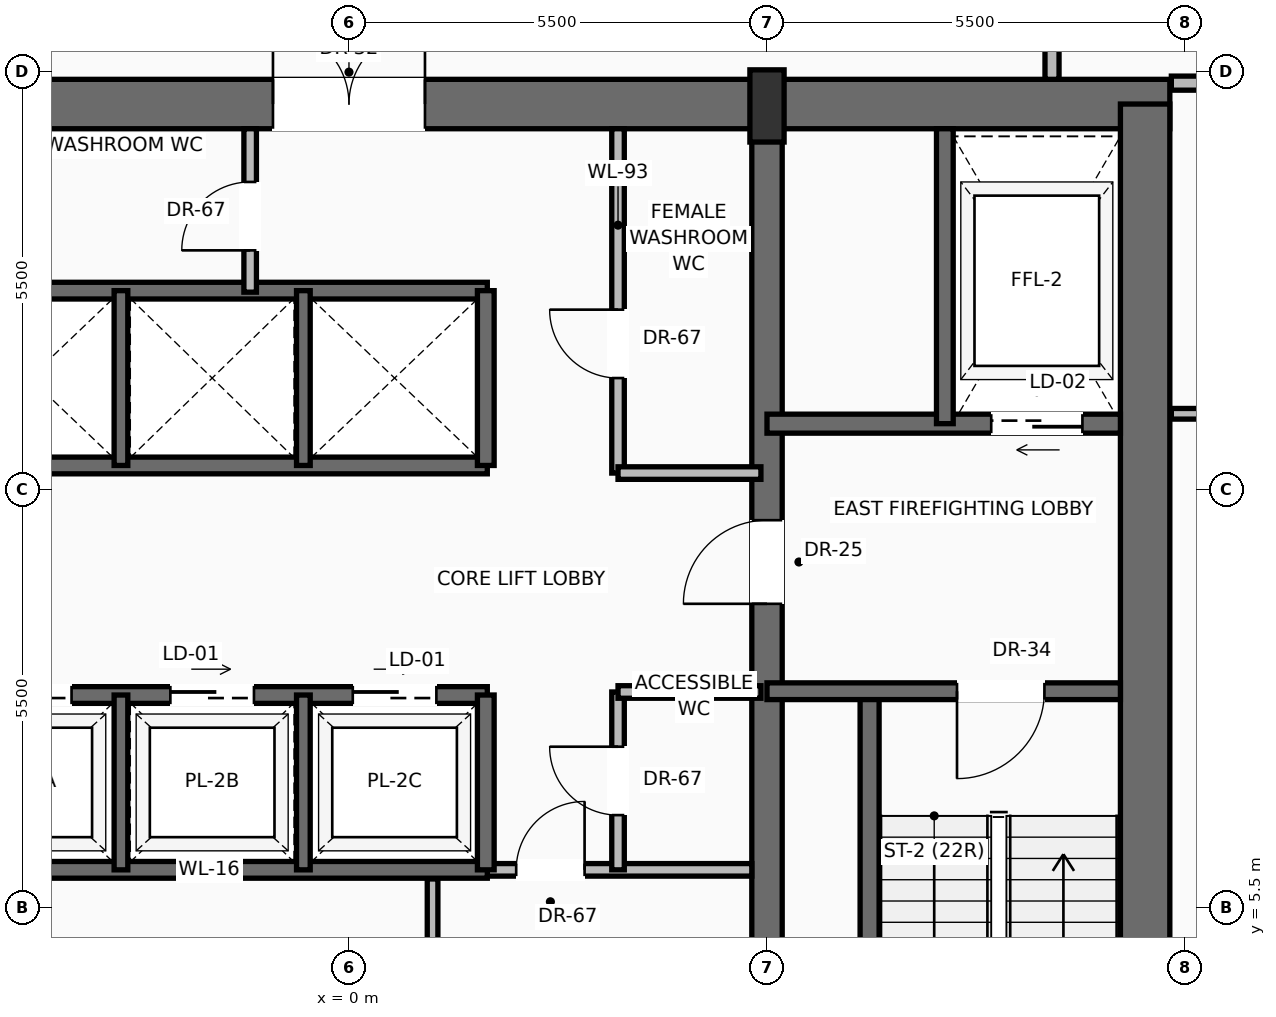
"""IFC4 building model, lengths in metres.
Left out: names, types, materials, properties, quantities, classifications, styles, units other than length and angle.
Written with IfcOpenShell. Run it as: python <this file> out.ifc"""

import sys

from ifc_helpers import new_model, si_unit, direction, frame, frame_2d, origin, origin_2d, place, context, subcontext, project, spatial, rectangle, extrude, source, transform, mapped, element, fill, save


model = new_model("IFC4")
c1 = context("Model", 3, precision=1e-05, world=origin(), true_north=direction((0.0, 1.0)))
c2 = subcontext(c1, "Body", "Model", "MODEL_VIEW")
j1 = project(units=[si_unit("LENGTHUNIT", "METRE"), si_unit("PLANEANGLEUNIT", "RADIAN")], contexts=[c1])
p1 = place(None, origin())
s1 = spatial("IfcSite", under=j1, at=p1, CompositionType="ELEMENT")
p2 = place(p1, origin())
s2 = spatial("IfcBuilding", under=s1, at=p2, CompositionType="ELEMENT")
p3 = place(p2, frame((0.0, 0.0, 133.0)))
s3 = spatial("IfcBuildingStorey", under=s2, at=p3, CompositionType="ELEMENT", Elevation=133.0)
p4 = place(p3, frame((-10.8, 16.075, 0.0), z_axis=(0.0, 0.0, 1.0), x_axis=(1.0, 0.0, 0.0)))
e1 = element("IfcWall", 1, at=p4, inside=s3, PredefinedType="SHEAR", context=c2, shape_type="SweptSolid", body=[
    extrude(rectangle(XDim=21.6, YDim=0.65, at=frame_2d((10.8, 0.0))), origin(), (0.0, 0.0, 1.0), 3.47),
])
p5 = place(p4, frame((3.37, 0.0, 0.0)))
e2 = element("IfcOpeningElement", 2, at=p5, cuts=e1, PredefinedType="OPENING", context=c2, shape_type="SweptSolid", body=[
    extrude(rectangle(XDim=1.3, YDim=2.3, at=frame_2d((0.65, 1.15))), frame((0.0, 0.335, 0.0), z_axis=(0.0, -1.0, 0.0), x_axis=(1.0, 0.0, 0.0)), (0.0, 0.0, 1.0), 0.67),
])
p6 = place(p4, frame((9.8, 0.0, 0.0)))
e3 = element("IfcOpeningElement", 3, at=p6, cuts=e1, PredefinedType="OPENING", context=c2, shape_type="SweptSolid", body=[
    extrude(rectangle(XDim=2.0, YDim=2.4, at=frame_2d((1.0, 1.2))), frame((0.0, 0.335, 0.0), z_axis=(0.0, -1.0, 0.0), x_axis=(1.0, 0.0, 0.0)), (0.0, 0.0, 1.0), 0.67),
])
p7 = place(p3, frame((10.475, 0.525, 0.0), z_axis=(0.0, 0.0, 1.0), x_axis=(0.0, 1.0, 0.0)))
e4 = element("IfcWall", 4, at=p7, inside=s3, PredefinedType="SHEAR", context=c2, shape_type="SweptSolid", body=[
    extrude(rectangle(XDim=15.55, YDim=0.65, at=frame_2d((7.775, 0.0))), origin(), (0.0, 0.0, 1.0), 3.47),
])
p8 = place(p3, frame((5.5, 0.525, 0.0), z_axis=(0.0, 0.0, 1.0), x_axis=(0.0, 1.0, 0.0)))
e5 = element("IfcWall", 5, at=p8, inside=s3, PredefinedType="SHEAR", context=c2, shape_type="SweptSolid", body=[
    extrude(rectangle(XDim=15.55, YDim=0.4, at=frame_2d((7.775, 0.0))), origin(), (0.0, 0.0, 1.0), 3.47),
])
p9 = place(p8, frame((8.975, 0.0, 0.0)))
e6 = element("IfcOpeningElement", 6, at=p9, cuts=e5, PredefinedType="OPENING", context=c2, shape_type="SweptSolid", body=[
    extrude(rectangle(XDim=1.1, YDim=2.2, at=frame_2d((0.55, 1.1))), frame((0.0, 0.21, 0.0), z_axis=(0.0, -1.0, 0.0), x_axis=(1.0, 0.0, 0.0)), (0.0, 0.0, 1.0), 0.42),
])
m1 = source(origin(), c2, "Body", "SweptSolid", [
    extrude(rectangle(XDim=0.45, YDim=0.95, at=origin_2d()), origin(), (0.0, 0.0, 1.0), 3.7),
])
p10 = place(p3, frame((5.5, 16.05, 0.0), z_axis=(0.0, 0.0, 1.0), x_axis=(1.0, 0.0, 0.0)))
e7 = element("IfcColumn", 7, at=p10, inside=s3, PredefinedType="PILASTER", context=c2, shape_type="MappedRepresentation", body=[
    mapped(m1, transform((0.0, 0.0, 0.0), scale=1.0)),
])
p11 = place(p3, frame((6.85, 0.85, 0.0), z_axis=(0.0, 0.0, 1.0), x_axis=(0.0, 1.0, 0.0)))
e8 = element("IfcWall", 8, at=p11, inside=s3, PredefinedType="SOLIDWALL", context=c2, shape_type="SweptSolid", body=[
    extrude(rectangle(XDim=7.5, YDim=0.25, at=frame_2d((3.75, 0.0))), origin(), (0.0, 0.0, 1.0), 3.47),
])
p12 = place(p3, frame((10.15, 8.35, 0.0), z_axis=(0.0, 0.0, 1.0), x_axis=(-1.0, 0.0, 0.0)))
e9 = element("IfcWall", 9, at=p12, inside=s3, PredefinedType="SOLIDWALL", context=c2, shape_type="SweptSolid", body=[
    extrude(rectangle(XDim=4.65, YDim=0.22, at=frame_2d((2.325, 0.0))), origin(), (0.0, 0.0, 1.0), 3.47),
])
p13 = place(p12, frame((1.0, 0.0, 0.0)))
e10 = element("IfcOpeningElement", 10, at=p13, cuts=e9, PredefinedType="OPENING", context=c2, shape_type="SweptSolid", body=[
    extrude(rectangle(XDim=1.15, YDim=2.2, at=frame_2d((0.575, 1.1))), frame((0.0, 0.12, 0.0), z_axis=(0.0, -1.0, 0.0), x_axis=(1.0, 0.0, 0.0)), (0.0, 0.0, 1.0), 0.24),
])
p14 = place(p3, frame((10.15, 11.87, 0.0), z_axis=(0.0, 0.0, 1.0), x_axis=(-1.0, 0.0, 0.0)))
e11 = element("IfcWall", 11, at=p14, inside=s3, PredefinedType="SOLIDWALL", context=c2, shape_type="SweptSolid", body=[
    extrude(rectangle(XDim=4.65, YDim=0.25, at=frame_2d((2.325, 0.0))), origin(), (0.0, 0.0, 1.0), 3.47),
])
p15 = place(p14, frame((0.5, 0.0, 0.0)))
e12 = element("IfcOpeningElement", 12, at=p15, cuts=e11, PredefinedType="OPENING", context=c2, shape_type="SweptSolid", body=[
    extrude(rectangle(XDim=1.2, YDim=2.25, at=frame_2d((0.6, 1.125))), frame((0.0, 0.135, 0.0), z_axis=(0.0, -1.0, 0.0), x_axis=(1.0, 0.0, 0.0)), (0.0, 0.0, 1.0), 0.27),
])
p16 = place(p3, frame((7.84, 11.87, 0.0), z_axis=(0.0, 0.0, 1.0), x_axis=(0.0, 1.0, 0.0)))
e13 = element("IfcWall", 13, at=p16, inside=s3, PredefinedType="SOLIDWALL", context=c2, shape_type="SweptSolid", body=[
    extrude(rectangle(XDim=3.88, YDim=0.22, at=frame_2d((1.94, 0.0))), origin(), (0.0, 0.0, 1.0), 3.47),
])
p17 = place(p3, frame((1.82, 6.0, 0.0), z_axis=(0.0, 0.0, 1.0), x_axis=(1.0, 0.0, 0.0)))
e14 = element("IfcWall", 14, at=p17, inside=s3, PredefinedType="PARTITIONING", context=c2, shape_type="SweptSolid", body=[
    extrude(rectangle(XDim=3.48, YDim=0.165, at=frame_2d((1.74, 0.0))), origin(), (0.0, 0.0, 1.0), 3.462),
])
p18 = place(p17, frame((0.38, 0.0, 0.0)))
e15 = element("IfcOpeningElement", 15, at=p18, cuts=e14, PredefinedType="OPENING", context=c2, shape_type="SweptSolid", body=[
    extrude(rectangle(XDim=0.9, YDim=2.1, at=frame_2d((0.45, 1.05))), frame((0.0, 0.093, 0.0), z_axis=(0.0, -1.0, 0.0), x_axis=(1.0, 0.0, 0.0)), (0.0, 0.0, 1.0), 0.185),
])
p19 = place(p3, frame((1.1, 0.85, 0.0), z_axis=(0.0, 0.0, 1.0), x_axis=(0.0, 1.0, 0.0)))
e16 = element("IfcWall", 16, at=p19, inside=s3, PredefinedType="PARTITIONING", context=c2, shape_type="SweptSolid", body=[
    extrude(rectangle(XDim=5.03, YDim=0.14, at=frame_2d((2.515, 0.0))), origin(), (0.0, 0.0, 1.0), 3.462),
])
p20 = place(p19, frame((2.1, 0.0, 0.0)))
e17 = element("IfcOpeningElement", 17, at=p20, cuts=e16, PredefinedType="OPENING", context=c2, shape_type="SweptSolid", body=[
    extrude(rectangle(XDim=0.9, YDim=2.1, at=frame_2d((0.45, 1.05))), frame((0.0, 0.08, 0.0), z_axis=(0.0, -1.0, 0.0), x_axis=(1.0, 0.0, 0.0)), (0.0, 0.0, 1.0), 0.16),
])
p21 = place(p3, frame((3.54, 6.0, 0.0), z_axis=(0.0, 0.0, 1.0), x_axis=(0.0, 1.0, 0.0)))
e18 = element("IfcWall", 18, at=p21, inside=s3, PredefinedType="PARTITIONING", context=c2, shape_type="SweptSolid", body=[
    extrude(rectangle(XDim=2.34, YDim=0.165, at=frame_2d((1.17, 0.0))), origin(), (0.0, 0.0, 1.0), 3.462),
])
p22 = place(p21, frame((0.72, 0.0, 0.0)))
e19 = element("IfcOpeningElement", 19, at=p22, cuts=e18, PredefinedType="OPENING", context=c2, shape_type="SweptSolid", body=[
    extrude(rectangle(XDim=0.9, YDim=2.1, at=frame_2d((0.45, 1.05))), frame((0.0, 0.093, 0.0), z_axis=(0.0, -1.0, 0.0), x_axis=(1.0, 0.0, 0.0)), (0.0, 0.0, 1.0), 0.185),
])
p23 = place(p3, frame((3.54, 8.34, 0.0), z_axis=(0.0, 0.0, 1.0), x_axis=(1.0, 0.0, 0.0)))
e20 = element("IfcWall", 20, at=p23, inside=s3, PredefinedType="PARTITIONING", context=c2, shape_type="SweptSolid", body=[
    extrude(rectangle(XDim=1.88, YDim=0.165, at=frame_2d((0.94, 0.0))), origin(), (0.0, 0.0, 1.0), 3.462),
])
p24 = place(p3, frame((-5.5, 6.0, 0.0), z_axis=(0.0, 0.0, 1.0), x_axis=(1.0, 0.0, 0.0)))
e21 = element("IfcWall", 21, at=p24, inside=s3, PredefinedType="SOLIDWALL", context=c2, shape_type="SweptSolid", body=[
    extrude(rectangle(XDim=7.32, YDim=0.22, at=frame_2d((3.66, 0.0))), origin(), (0.0, 0.0, 1.0), 3.47),
])
p25 = place(p3, frame((-5.5, 8.3, 0.0), z_axis=(0.0, 0.0, 1.0), x_axis=(1.0, 0.0, 0.0)))
e22 = element("IfcWall", 22, at=p25, inside=s3, PredefinedType="SOLIDWALL", context=c2, shape_type="SweptSolid", body=[
    extrude(rectangle(XDim=7.32, YDim=0.22, at=frame_2d((3.66, 0.0))), origin(), (0.0, 0.0, 1.0), 3.47),
])
p26 = place(p25, frame((0.75, 0.0, 0.0)))
e23 = element("IfcOpeningElement", 23, at=p26, cuts=e22, PredefinedType="OPENING", context=c2, shape_type="SweptSolid", body=[
    extrude(rectangle(XDim=1.1, YDim=2.2, at=frame_2d((0.55, 1.1))), frame((0.0, 0.12, 0.0), z_axis=(0.0, -1.0, 0.0), x_axis=(1.0, 0.0, 0.0)), (0.0, 0.0, 1.0), 0.24),
])
p27 = place(p25, frame((3.15, 0.0, 0.0)))
e24 = element("IfcOpeningElement", 24, at=p27, cuts=e22, PredefinedType="OPENING", context=c2, shape_type="SweptSolid", body=[
    extrude(rectangle(XDim=1.1, YDim=2.2, at=frame_2d((0.55, 1.1))), frame((0.0, 0.12, 0.0), z_axis=(0.0, -1.0, 0.0), x_axis=(1.0, 0.0, 0.0)), (0.0, 0.0, 1.0), 0.24),
])
p28 = place(p25, frame((5.55, 0.0, 0.0)))
e25 = element("IfcOpeningElement", 25, at=p28, cuts=e22, PredefinedType="OPENING", context=c2, shape_type="SweptSolid", body=[
    extrude(rectangle(XDim=1.1, YDim=2.2, at=frame_2d((0.55, 1.1))), frame((0.0, 0.12, 0.0), z_axis=(0.0, -1.0, 0.0), x_axis=(1.0, 0.0, 0.0)), (0.0, 0.0, 1.0), 0.24),
])
p29 = place(p3, frame((1.8, 6.0, 0.0), z_axis=(0.0, 0.0, 1.0), x_axis=(0.0, 1.0, 0.0)))
e26 = element("IfcWall", 26, at=p29, inside=s3, PredefinedType="SOLIDWALL", context=c2, shape_type="SweptSolid", body=[
    extrude(rectangle(XDim=2.3, YDim=0.22, at=frame_2d((1.15, 0.0))), origin(), (0.0, 0.0, 1.0), 3.47),
])
for number, where, z_axis, x_axis in (
    (27, (-3.0, 6.0, 0.0), (0.0, 0.0, 1.0), (0.0, 1.0, 0.0)),
    (28, (-0.6, 6.0, 0.0), (0.0, 0.0, 1.0), (0.0, 1.0, 0.0)),
):
    element("IfcWall", number, at=place(p3, frame(where, z_axis=z_axis, x_axis=x_axis)), inside=s3, PredefinedType="SOLIDWALL", context=c2, shape_type="SweptSolid", body=[
        extrude(rectangle(XDim=2.3, YDim=0.18, at=frame_2d((1.15, 0.0))), origin(), (0.0, 0.0, 1.0), 3.47),
    ])
for number, where, z_axis, x_axis in (
    (29, (-5.5, 11.32, 0.0), (0.0, 0.0, 1.0), (1.0, 0.0, 0.0)),
    (30, (-5.5, 13.62, 0.0), (0.0, 0.0, 1.0), (1.0, 0.0, 0.0)),
):
    element("IfcWall", number, at=place(p3, frame(where, z_axis=z_axis, x_axis=x_axis)), inside=s3, PredefinedType="SOLIDWALL", context=c2, shape_type="SweptSolid", body=[
        extrude(rectangle(XDim=7.32, YDim=0.22, at=frame_2d((3.66, 0.0))), origin(), (0.0, 0.0, 1.0), 3.47),
    ])
p30 = place(p3, frame((1.8, 11.32, 0.0), z_axis=(0.0, 0.0, 1.0), x_axis=(0.0, 1.0, 0.0)))
e31 = element("IfcWall", 31, at=p30, inside=s3, PredefinedType="SOLIDWALL", context=c2, shape_type="SweptSolid", body=[
    extrude(rectangle(XDim=2.3, YDim=0.22, at=frame_2d((1.15, 0.0))), origin(), (0.0, 0.0, 1.0), 3.47),
])
for number, where, z_axis, x_axis in (
    (32, (-3.0, 11.32, 0.0), (0.0, 0.0, 1.0), (0.0, 1.0, 0.0)),
    (33, (-0.6, 11.32, 0.0), (0.0, 0.0, 1.0), (0.0, 1.0, 0.0)),
):
    element("IfcWall", number, at=place(p3, frame(where, z_axis=z_axis, x_axis=x_axis)), inside=s3, PredefinedType="SOLIDWALL", context=c2, shape_type="SweptSolid", body=[
        extrude(rectangle(XDim=2.3, YDim=0.18, at=frame_2d((1.15, 0.0))), origin(), (0.0, 0.0, 1.0), 3.47),
    ])
p31 = place(p3, frame((-1.3, 13.6, 0.0), z_axis=(0.0, 0.0, 1.0), x_axis=(0.0, 1.0, 0.0)))
e34 = element("IfcWall", 34, at=p31, inside=s3, PredefinedType="PARTITIONING", context=c2, shape_type="SweptSolid", body=[
    extrude(rectangle(XDim=2.15, YDim=0.165, at=frame_2d((1.075, 0.0))), origin(), (0.0, 0.0, 1.0), 3.462),
])
p32 = place(p31, frame((0.55, 0.0, 0.0)))
e35 = element("IfcOpeningElement", 35, at=p32, cuts=e34, PredefinedType="OPENING", context=c2, shape_type="SweptSolid", body=[
    extrude(rectangle(XDim=0.9, YDim=2.1, at=frame_2d((0.45, 1.05))), frame((0.0, 0.093, 0.0), z_axis=(0.0, -1.0, 0.0), x_axis=(1.0, 0.0, 0.0)), (0.0, 0.0, 1.0), 0.185),
])
p33 = place(p3, frame((3.54, 11.22, 0.0), z_axis=(0.0, 0.0, 1.0), x_axis=(0.0, 1.0, 0.0)))
e36 = element("IfcWall", 36, at=p33, inside=s3, PredefinedType="PARTITIONING", context=c2, shape_type="SweptSolid", body=[
    extrude(rectangle(XDim=4.53, YDim=0.165, at=frame_2d((2.265, 0.0))), origin(), (0.0, 0.0, 1.0), 3.462),
])
p34 = place(p33, frame((1.25, 0.0, 0.0)))
e37 = element("IfcOpeningElement", 37, at=p34, cuts=e36, PredefinedType="OPENING", context=c2, shape_type="SweptSolid", body=[
    extrude(rectangle(XDim=0.9, YDim=2.1, at=frame_2d((0.45, 1.05))), frame((0.0, 0.093, 0.0), z_axis=(0.0, -1.0, 0.0), x_axis=(1.0, 0.0, 0.0)), (0.0, 0.0, 1.0), 0.185),
])
p35 = place(p3, frame((3.54, 11.22, 0.0), z_axis=(0.0, 0.0, 1.0), x_axis=(1.0, 0.0, 0.0)))
e38 = element("IfcWall", 38, at=p35, inside=s3, PredefinedType="PARTITIONING", context=c2, shape_type="SweptSolid", body=[
    extrude(rectangle(XDim=1.88, YDim=0.165, at=frame_2d((0.94, 0.0))), origin(), (0.0, 0.0, 1.0), 3.462),
])
p36 = place(p3, frame((9.25, 16.4, 0.0), z_axis=(0.0, 0.0, 1.0), x_axis=(0.0, 1.0, 0.0)))
e39 = element("IfcWall", 39, at=p36, inside=s3, PredefinedType="PARTITIONING", context=c2, shape_type="SweptSolid", body=[
    extrude(rectangle(XDim=9.0, YDim=0.185, at=frame_2d((4.5, 0.0))), origin(), (0.0, 0.0, 1.0), 2.846),
])
p37 = place(p36, frame((4.441, 0.0, 0.0)))
e40 = element("IfcOpeningElement", 40, at=p37, cuts=e39, PredefinedType="OPENING", context=c2, shape_type="SweptSolid", body=[
    extrude(rectangle(XDim=0.95, YDim=2.2, at=frame_2d((0.475, 1.1))), frame((0.0, 0.103, 0.0), z_axis=(0.0, -1.0, 0.0), x_axis=(1.0, 0.0, 0.0)), (0.0, 0.0, 1.0), 0.205),
])
p38 = place(p3, frame((10.82, 16.35, 0.0), z_axis=(0.0, 0.0, 1.0), x_axis=(1.0, 0.0, 0.0)))
e41 = element("IfcWall", 41, at=p38, inside=s3, PredefinedType="PARTITIONING", context=c2, shape_type="SweptSolid", body=[
    extrude(rectangle(XDim=11.333, YDim=0.185, at=frame_2d((5.667, 0.0))), origin(), (0.0, 0.0, 1.0), 3.462),
])
p39 = place(p38, frame((3.594, 0.0, 0.0)))
e42 = element("IfcOpeningElement", 42, at=p39, cuts=e41, PredefinedType="OPENING", context=c2, shape_type="SweptSolid", body=[
    extrude(rectangle(XDim=0.95, YDim=2.2, at=frame_2d((0.475, 1.1))), frame((0.0, 0.103, 0.0), z_axis=(0.0, -1.0, 0.0), x_axis=(1.0, 0.0, 0.0)), (0.0, 0.0, 1.0), 0.205),
])
p40 = place(p3, frame((10.82, 12.0, 0.0), z_axis=(0.0, 0.0, 1.0), x_axis=(1.0, 0.0, 0.0)))
e43 = element("IfcWall", 43, at=p40, inside=s3, PredefinedType="PARTITIONING", context=c2, shape_type="SweptSolid", body=[
    extrude(rectangle(XDim=14.109, YDim=0.14, at=frame_2d((7.055, 0.0))), origin(), (0.0, 0.0, 1.0), 3.462),
])
p41 = place(p40, frame((6.572, 0.0, 0.0)))
e44 = element("IfcOpeningElement", 44, at=p41, cuts=e43, PredefinedType="OPENING", context=c2, shape_type="SweptSolid", body=[
    extrude(rectangle(XDim=0.95, YDim=2.2, at=frame_2d((0.475, 1.1))), frame((0.0, 0.08, 0.0), z_axis=(0.0, -1.0, 0.0), x_axis=(1.0, 0.0, 0.0)), (0.0, 0.0, 1.0), 0.16),
])
m2 = source(origin(), c2, "Body", "SweptSolid", [
    extrude(rectangle(XDim=1.15, YDim=2.2, at=frame_2d((0.575, 1.1))), frame((0.0, 0.025, 0.0), z_axis=(0.0, -1.0, 0.0), x_axis=(1.0, 0.0, 0.0)), (0.0, 0.0, 1.0), 0.05),
])
p42 = place(p13, origin())
e45 = element("IfcDoor", 45, at=p42, inside=s3, OperationType="SINGLE_SWING_RIGHT", PredefinedType="DOOR", context=c2, shape_type="MappedRepresentation", body=[
    mapped(m2, transform((0.0, 0.0, 0.0), scale=1.0)),
])
fill(e10, e45)
m3 = source(origin(), c2, "Body", "SweptSolid", [
    extrude(rectangle(XDim=1.1, YDim=2.2, at=frame_2d((0.55, 1.1))), frame((0.0, 0.025, 0.0), z_axis=(0.0, -1.0, 0.0), x_axis=(1.0, 0.0, 0.0)), (0.0, 0.0, 1.0), 0.05),
])
p43 = place(p9, origin())
e46 = element("IfcDoor", 46, at=p43, inside=s3, OperationType="SINGLE_SWING_LEFT", PredefinedType="DOOR", context=c2, shape_type="MappedRepresentation", body=[
    mapped(m3, transform((0.0, 0.0, 0.0), scale=1.0)),
])
fill(e6, e46)
m4 = source(origin(), c2, "Body", "SweptSolid", [
    extrude(rectangle(XDim=1.2, YDim=2.25, at=frame_2d((0.6, 1.125))), frame((0.0, 0.025, 0.0), z_axis=(0.0, -1.0, 0.0), x_axis=(1.0, 0.0, 0.0)), (0.0, 0.0, 1.0), 0.05),
])
p44 = place(p15, origin())
e47 = element("IfcDoor", 47, at=p44, inside=s3, OperationType="SLIDING_TO_RIGHT", PredefinedType="DOOR", context=c2, shape_type="MappedRepresentation", body=[
    mapped(m4, transform((0.0, 0.0, 0.0), scale=1.0)),
])
fill(e12, e47)
m5 = source(origin(), c2, "Body", "SweptSolid", [
    extrude(rectangle(XDim=2.0, YDim=2.4, at=frame_2d((1.0, 1.2))), frame((0.0, 0.025, 0.0), z_axis=(0.0, -1.0, 0.0), x_axis=(1.0, 0.0, 0.0)), (0.0, 0.0, 1.0), 0.05),
])
p45 = place(p6, origin())
e48 = element("IfcDoor", 48, at=p45, inside=s3, OperationType="DOUBLE_DOOR_SINGLE_SWING", PredefinedType="DOOR", context=c2, shape_type="MappedRepresentation", body=[
    mapped(m5, transform((0.0, 0.0, 0.0), scale=1.0)),
])
fill(e3, e48)
m6 = source(origin(), c2, "Body", "SweptSolid", [
    extrude(rectangle(XDim=0.9, YDim=2.1, at=frame_2d((0.45, 1.05))), frame((0.0, 0.025, 0.0), z_axis=(0.0, -1.0, 0.0), x_axis=(1.0, 0.0, 0.0)), (0.0, 0.0, 1.0), 0.05),
])
p46 = place(p18, origin())
e49 = element("IfcDoor", 49, at=p46, inside=s3, OperationType="SINGLE_SWING_RIGHT", PredefinedType="DOOR", context=c2, shape_type="MappedRepresentation", body=[
    mapped(m6, transform((0.0, 0.0, 0.0), scale=1.0)),
])
fill(e15, e49)
p47 = place(p22, origin())
e50 = element("IfcDoor", 50, at=p47, inside=s3, OperationType="SINGLE_SWING_RIGHT", PredefinedType="DOOR", context=c2, shape_type="MappedRepresentation", body=[
    mapped(m6, transform((0.0, 0.0, 0.0), scale=1.0)),
])
fill(e19, e50)
m7 = source(origin(), c2, "Body", "SweptSolid", [
    extrude(rectangle(XDim=1.1, YDim=2.2, at=frame_2d((0.55, 1.1))), frame((0.0, 0.025, 0.0), z_axis=(0.0, -1.0, 0.0), x_axis=(1.0, 0.0, 0.0)), (0.0, 0.0, 1.0), 0.05),
])
p48 = place(p26, origin())
e51 = element("IfcDoor", 51, at=p48, inside=s3, OperationType="SLIDING_TO_LEFT", PredefinedType="DOOR", context=c2, shape_type="MappedRepresentation", body=[
    mapped(m7, transform((0.0, 0.0, 0.0), scale=1.0)),
])
fill(e23, e51)
p49 = place(p27, origin())
e52 = element("IfcDoor", 52, at=p49, inside=s3, OperationType="SLIDING_TO_LEFT", PredefinedType="DOOR", context=c2, shape_type="MappedRepresentation", body=[
    mapped(m7, transform((0.0, 0.0, 0.0), scale=1.0)),
])
fill(e24, e52)
p50 = place(p28, origin())
e53 = element("IfcDoor", 53, at=p50, inside=s3, OperationType="SLIDING_TO_LEFT", PredefinedType="DOOR", context=c2, shape_type="MappedRepresentation", body=[
    mapped(m7, transform((0.0, 0.0, 0.0), scale=1.0)),
])
fill(e25, e53)
p51 = place(p32, origin())
e54 = element("IfcDoor", 54, at=p51, inside=s3, OperationType="SINGLE_SWING_LEFT", PredefinedType="DOOR", context=c2, shape_type="MappedRepresentation", body=[
    mapped(m6, transform((0.0, 0.0, 0.0), scale=1.0)),
])
fill(e35, e54)
p52 = place(p34, origin())
e55 = element("IfcDoor", 55, at=p52, inside=s3, OperationType="SINGLE_SWING_RIGHT", PredefinedType="DOOR", context=c2, shape_type="MappedRepresentation", body=[
    mapped(m6, transform((0.0, 0.0, 0.0), scale=1.0)),
])
fill(e37, e55)
save(model, sys.argv[1])
